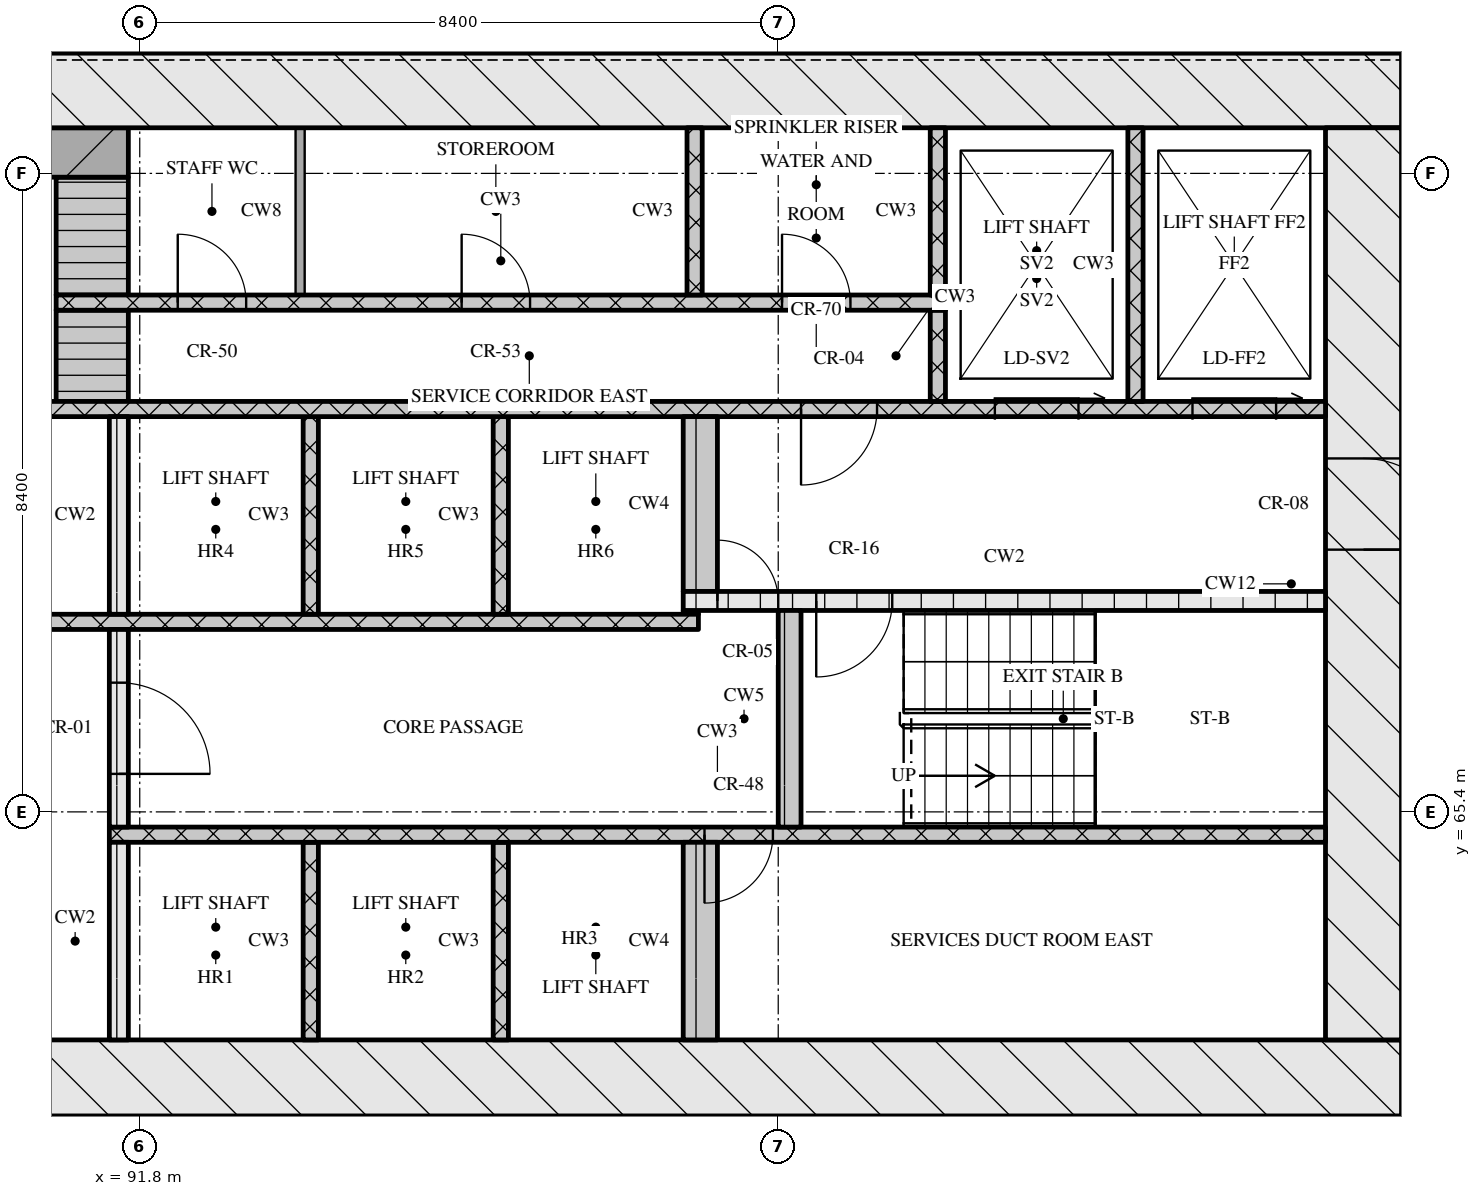
"""IFC4 building model, lengths in metres.
Left out: names, types, materials, properties, quantities, classifications, styles, units other than length and angle.
Written with IfcOpenShell. Run it as: python <this file> out.ifc"""

import sys

from ifc_helpers import new_model, si_unit, direction, frame, frame_2d, origin, place, context, subcontext, project, spatial, rectangle, extrude, element, fill, save


model = new_model("IFC4")
c1 = context("Model", 3, precision=1e-05, world=origin(), true_north=direction((0.0, 1.0)))
c2 = subcontext(c1, "Body", "Model", "MODEL_VIEW")
j1 = project(units=[si_unit("LENGTHUNIT", "METRE"), si_unit("PLANEANGLEUNIT", "RADIAN")], contexts=[c1])
p1 = place(None, origin())
s1 = spatial("IfcSite", under=j1, at=p1, CompositionType="ELEMENT")
p2 = place(p1, origin())
s2 = spatial("IfcBuilding", under=s1, at=p2, CompositionType="ELEMENT")
p3 = place(p2, frame((0.0, 0.0, 106.05)))
s3 = spatial("IfcBuildingStorey", under=s2, at=p3, CompositionType="ELEMENT", Elevation=106.05)
p4 = place(p3, frame((66.8, 61.9, 0.0), z_axis=(0.0, 0.0, 1.0), x_axis=(1.0, 0.0, 0.0)))
e1 = element("IfcWall", 1, at=p4, inside=s3, PredefinedType="SOLIDWALL", context=c2, shape_type="SweptSolid", body=[
    extrude(rectangle(XDim=41.6, YDim=1.0, at=frame_2d((20.8, 0.0))), origin(), (0.0, 0.0, 1.0), 3.32),
])
p5 = place(p4, frame((21.15, 0.0, 0.0)))
e2 = element("IfcOpeningElement", 2, at=p5, cuts=e1, PredefinedType="OPENING", context=c2, shape_type="SweptSolid", body=[
    extrude(rectangle(XDim=1.8, YDim=2.1, at=frame_2d((0.9, 1.05))), frame((0.0, 0.51, 0.0), z_axis=(0.0, -1.0, 0.0), x_axis=(1.0, 0.0, 0.0)), (0.0, 0.0, 1.0), 1.02),
])
p6 = place(p3, frame((66.8, 74.9, 0.0), z_axis=(0.0, 0.0, 1.0), x_axis=(1.0, 0.0, 0.0)))
e3 = element("IfcWall", 3, at=p6, inside=s3, PredefinedType="SOLIDWALL", context=c2, shape_type="SweptSolid", body=[
    extrude(rectangle(XDim=41.6, YDim=1.0, at=frame_2d((20.8, 0.0))), origin(), (0.0, 0.0, 1.0), 3.32),
])
p7 = place(p3, frame((107.9, 62.4, 0.0), z_axis=(0.0, 0.0, 1.0), x_axis=(0.0, 1.0, 0.0)))
e4 = element("IfcWall", 4, at=p7, inside=s3, PredefinedType="SOLIDWALL", context=c2, shape_type="SweptSolid", body=[
    extrude(rectangle(XDim=12.0, YDim=1.0, at=frame_2d((6.0, 0.0))), origin(), (0.0, 0.0, 1.0), 3.32),
])
p8 = place(p7, frame((6.45, 0.0, 0.0)))
e5 = element("IfcOpeningElement", 5, at=p8, cuts=e4, PredefinedType="OPENING", context=c2, shape_type="SweptSolid", body=[
    extrude(rectangle(XDim=1.2, YDim=2.1, at=frame_2d((0.6, 1.05))), frame((0.0, 0.51, 0.0), z_axis=(0.0, -1.0, 0.0), x_axis=(1.0, 0.0, 0.0)), (0.0, 0.0, 1.0), 1.02),
])
p9 = place(p3, frame((91.525, 62.4, 0.0), z_axis=(0.0, 0.0, 1.0), x_axis=(0.0, 1.0, 0.0)))
e6 = element("IfcWall", 6, at=p9, inside=s3, PredefinedType="SOLIDWALL", context=c2, shape_type="SweptSolid", body=[
    extrude(rectangle(XDim=2.6, YDim=0.25, at=frame_2d((1.3, 0.0))), origin(), (0.0, 0.0, 1.0), 3.32),
])
for number, where, z_axis, x_axis in (
    (7, (94.05, 62.4, 0.0), (0.0, 0.0, 1.0), (0.0, 1.0, 0.0)),
    (8, (96.55, 62.4, 0.0), (0.0, 0.0, 1.0), (0.0, 1.0, 0.0)),
):
    element("IfcWall", number, at=place(p3, frame(where, z_axis=z_axis, x_axis=x_axis)), inside=s3, PredefinedType="SOLIDWALL", context=c2, shape_type="SweptSolid", body=[
        extrude(rectangle(XDim=2.6, YDim=0.2, at=frame_2d((1.3, 0.0))), origin(), (0.0, 0.0, 1.0), 3.32),
    ])
p10 = place(p3, frame((99.175, 62.4, 0.0), z_axis=(0.0, 0.0, 1.0), x_axis=(0.0, 1.0, 0.0)))
e9 = element("IfcWall", 9, at=p10, inside=s3, PredefinedType="SOLIDWALL", context=c2, shape_type="SweptSolid", body=[
    extrude(rectangle(XDim=2.6, YDim=0.45, at=frame_2d((1.3, 0.0))), origin(), (0.0, 0.0, 1.0), 3.32),
])
p11 = place(p3, frame((91.4, 65.1, 0.0), z_axis=(0.0, 0.0, 1.0), x_axis=(1.0, 0.0, 0.0)))
e10 = element("IfcWall", 10, at=p11, inside=s3, PredefinedType="SOLIDWALL", context=c2, shape_type="SweptSolid", body=[
    extrude(rectangle(XDim=16.0, YDim=0.2, at=frame_2d((8.0, 0.0))), origin(), (0.0, 0.0, 1.0), 3.32),
])
p12 = place(p11, frame((7.83, 0.0, 0.0)))
e11 = element("IfcOpeningElement", 11, at=p12, cuts=e10, PredefinedType="OPENING", context=c2, shape_type="SweptSolid", body=[
    extrude(rectangle(XDim=0.9, YDim=2.1, at=frame_2d((0.45, 1.05))), frame((0.0, 0.11, 0.0), z_axis=(0.0, -1.0, 0.0), x_axis=(1.0, 0.0, 0.0)), (0.0, 0.0, 1.0), 0.22),
])
p13 = place(p3, frame((91.525, 65.2, 0.0), z_axis=(0.0, 0.0, 1.0), x_axis=(0.0, 1.0, 0.0)))
e12 = element("IfcWall", 12, at=p13, inside=s3, PredefinedType="SOLIDWALL", context=c2, shape_type="SweptSolid", body=[
    extrude(rectangle(XDim=2.6, YDim=0.25, at=frame_2d((1.3, 0.0))), origin(), (0.0, 0.0, 1.0), 3.32),
])
p14 = place(p13, frame((0.7, 0.0, 0.0)))
e13 = element("IfcOpeningElement", 13, at=p14, cuts=e12, PredefinedType="OPENING", context=c2, shape_type="SweptSolid", body=[
    extrude(rectangle(XDim=1.2, YDim=2.1, at=frame_2d((0.6, 1.05))), frame((0.0, 0.135, 0.0), z_axis=(0.0, -1.0, 0.0), x_axis=(1.0, 0.0, 0.0)), (0.0, 0.0, 1.0), 0.27),
])
p15 = place(p3, frame((100.35, 65.2, 0.0), z_axis=(0.0, 0.0, 1.0), x_axis=(0.0, 1.0, 0.0)))
e14 = element("IfcWall", 14, at=p15, inside=s3, PredefinedType="SOLIDWALL", context=c2, shape_type="SweptSolid", body=[
    extrude(rectangle(XDim=2.85, YDim=0.3, at=frame_2d((1.425, 0.0))), origin(), (0.0, 0.0, 1.0), 3.32),
])
p16 = place(p3, frame((76.05, 67.9, 0.0), z_axis=(0.0, 0.0, 1.0), x_axis=(1.0, 0.0, 0.0)))
e15 = element("IfcWall", 15, at=p16, inside=s3, PredefinedType="SOLIDWALL", context=c2, shape_type="SweptSolid", body=[
    extrude(rectangle(XDim=23.1, YDim=0.2, at=frame_2d((11.55, 0.0))), origin(), (0.0, 0.0, 1.0), 3.32),
])
p17 = place(p16, frame((0.6, 0.0, 0.0)))
e16 = element("IfcOpeningElement", 16, at=p17, cuts=e15, PredefinedType="OPENING", context=c2, shape_type="SweptSolid", body=[
    extrude(rectangle(XDim=1.1, YDim=2.1, at=frame_2d((0.55, 1.05))), frame((0.0, 0.11, 0.0), z_axis=(0.0, -1.0, 0.0), x_axis=(1.0, 0.0, 0.0)), (0.0, 0.0, 1.0), 0.22),
])
p18 = place(p16, frame((3.1, 0.0, 0.0)))
e17 = element("IfcOpeningElement", 17, at=p18, cuts=e15, PredefinedType="OPENING", context=c2, shape_type="SweptSolid", body=[
    extrude(rectangle(XDim=1.1, YDim=2.1, at=frame_2d((0.55, 1.05))), frame((0.0, 0.11, 0.0), z_axis=(0.0, -1.0, 0.0), x_axis=(1.0, 0.0, 0.0)), (0.0, 0.0, 1.0), 0.22),
])
p19 = place(p16, frame((5.6, 0.0, 0.0)))
e18 = element("IfcOpeningElement", 18, at=p19, cuts=e15, PredefinedType="OPENING", context=c2, shape_type="SweptSolid", body=[
    extrude(rectangle(XDim=1.1, YDim=2.1, at=frame_2d((0.55, 1.05))), frame((0.0, 0.11, 0.0), z_axis=(0.0, -1.0, 0.0), x_axis=(1.0, 0.0, 0.0)), (0.0, 0.0, 1.0), 0.22),
])
p20 = place(p16, frame((9.7, 0.0, 0.0)))
e19 = element("IfcOpeningElement", 19, at=p20, cuts=e15, PredefinedType="OPENING", context=c2, shape_type="SweptSolid", body=[
    extrude(rectangle(XDim=0.9, YDim=2.1, at=frame_2d((0.45, 1.05))), frame((0.0, 0.11, 0.0), z_axis=(0.0, -1.0, 0.0), x_axis=(1.0, 0.0, 0.0)), (0.0, 0.0, 1.0), 0.22),
])
p21 = place(p16, frame((13.55, 0.0, 0.0)))
e20 = element("IfcOpeningElement", 20, at=p21, cuts=e15, PredefinedType="OPENING", context=c2, shape_type="SweptSolid", body=[
    extrude(rectangle(XDim=1.0, YDim=2.1, at=frame_2d((0.5, 1.05))), frame((0.0, 0.11, 0.0), z_axis=(0.0, -1.0, 0.0), x_axis=(1.0, 0.0, 0.0)), (0.0, 0.0, 1.0), 0.22),
])
p22 = place(p3, frame((91.525, 68.0, 0.0), z_axis=(0.0, 0.0, 1.0), x_axis=(0.0, 1.0, 0.0)))
e21 = element("IfcWall", 21, at=p22, inside=s3, PredefinedType="SOLIDWALL", context=c2, shape_type="SweptSolid", body=[
    extrude(rectangle(XDim=2.6, YDim=0.25, at=frame_2d((1.3, 0.0))), origin(), (0.0, 0.0, 1.0), 3.32),
])
for number, where, z_axis, x_axis in (
    (22, (94.05, 68.0, 0.0), (0.0, 0.0, 1.0), (0.0, 1.0, 0.0)),
    (23, (96.55, 68.0, 0.0), (0.0, 0.0, 1.0), (0.0, 1.0, 0.0)),
):
    element("IfcWall", number, at=place(p3, frame(where, z_axis=z_axis, x_axis=x_axis)), inside=s3, PredefinedType="SOLIDWALL", context=c2, shape_type="SweptSolid", body=[
        extrude(rectangle(XDim=2.6, YDim=0.2, at=frame_2d((1.3, 0.0))), origin(), (0.0, 0.0, 1.0), 3.32),
    ])
p23 = place(p3, frame((98.95, 68.025, 0.0), z_axis=(0.0, 0.0, 1.0), x_axis=(1.0, 0.0, 0.0)))
e24 = element("IfcWall", 24, at=p23, inside=s3, PredefinedType="SOLIDWALL", context=c2, shape_type="SweptSolid", body=[
    extrude(rectangle(XDim=0.2, YDim=0.05, at=frame_2d((0.1, 0.0))), origin(), (0.0, 0.0, 1.0), 3.32),
])
p24 = place(p3, frame((98.95, 68.175, 0.0), z_axis=(0.0, 0.0, 1.0), x_axis=(1.0, 0.0, 0.0)))
e25 = element("IfcWall", 25, at=p24, inside=s3, PredefinedType="SOLIDWALL", context=c2, shape_type="SweptSolid", body=[
    extrude(rectangle(XDim=8.45, YDim=0.25, at=frame_2d((4.225, 0.0))), origin(), (0.0, 0.0, 1.0), 3.32),
])
p25 = place(p24, frame((0.45, 0.0, 0.0)))
e26 = element("IfcOpeningElement", 26, at=p25, cuts=e25, PredefinedType="OPENING", context=c2, shape_type="SweptSolid", body=[
    extrude(rectangle(XDim=0.8, YDim=2.1, at=frame_2d((0.4, 1.05))), frame((0.0, 0.135, 0.0), z_axis=(0.0, -1.0, 0.0), x_axis=(1.0, 0.0, 0.0)), (0.0, 0.0, 1.0), 0.27),
])
p26 = place(p24, frame((1.75, 0.0, 0.0)))
e27 = element("IfcOpeningElement", 27, at=p26, cuts=e25, PredefinedType="OPENING", context=c2, shape_type="SweptSolid", body=[
    extrude(rectangle(XDim=1.0, YDim=2.1, at=frame_2d((0.5, 1.05))), frame((0.0, 0.135, 0.0), z_axis=(0.0, -1.0, 0.0), x_axis=(1.0, 0.0, 0.0)), (0.0, 0.0, 1.0), 0.27),
])
p27 = place(p3, frame((99.175, 68.3, 0.0), z_axis=(0.0, 0.0, 1.0), x_axis=(0.0, 1.0, 0.0)))
e28 = element("IfcWall", 28, at=p27, inside=s3, PredefinedType="SOLIDWALL", context=c2, shape_type="SweptSolid", body=[
    extrude(rectangle(XDim=2.3, YDim=0.45, at=frame_2d((1.15, 0.0))), origin(), (0.0, 0.0, 1.0), 3.32),
])
p28 = place(p3, frame((67.8, 70.7, 0.0), z_axis=(0.0, 0.0, 1.0), x_axis=(1.0, 0.0, 0.0)))
e29 = element("IfcWall", 29, at=p28, inside=s3, PredefinedType="SOLIDWALL", context=c2, shape_type="SweptSolid", body=[
    extrude(rectangle(XDim=39.6, YDim=0.2, at=frame_2d((19.8, 0.0))), origin(), (0.0, 0.0, 1.0), 3.32),
])
p29 = place(p28, frame((0.65, 0.0, 0.0)))
e30 = element("IfcOpeningElement", 30, at=p29, cuts=e29, PredefinedType="OPENING", context=c2, shape_type="SweptSolid", body=[
    extrude(rectangle(XDim=1.1, YDim=2.1, at=frame_2d((0.55, 1.05))), frame((0.0, 0.11, 0.0), z_axis=(0.0, -1.0, 0.0), x_axis=(1.0, 0.0, 0.0)), (0.0, 0.0, 1.0), 0.22),
])
p30 = place(p28, frame((3.25, 0.0, 0.0)))
e31 = element("IfcOpeningElement", 31, at=p30, cuts=e29, PredefinedType="OPENING", context=c2, shape_type="SweptSolid", body=[
    extrude(rectangle(XDim=1.1, YDim=2.1, at=frame_2d((0.55, 1.05))), frame((0.0, 0.11, 0.0), z_axis=(0.0, -1.0, 0.0), x_axis=(1.0, 0.0, 0.0)), (0.0, 0.0, 1.0), 0.22),
])
p31 = place(p28, frame((5.9, 0.0, 0.0)))
e32 = element("IfcOpeningElement", 32, at=p31, cuts=e29, PredefinedType="OPENING", context=c2, shape_type="SweptSolid", body=[
    extrude(rectangle(XDim=1.0, YDim=2.1, at=frame_2d((0.5, 1.05))), frame((0.0, 0.11, 0.0), z_axis=(0.0, -1.0, 0.0), x_axis=(1.0, 0.0, 0.0)), (0.0, 0.0, 1.0), 0.22),
])
p32 = place(p28, frame((21.7, 0.0, 0.0)))
e33 = element("IfcOpeningElement", 33, at=p32, cuts=e29, PredefinedType="OPENING", context=c2, shape_type="SweptSolid", body=[
    extrude(rectangle(XDim=1.0, YDim=2.1, at=frame_2d((0.5, 1.05))), frame((0.0, 0.11, 0.0), z_axis=(0.0, -1.0, 0.0), x_axis=(1.0, 0.0, 0.0)), (0.0, 0.0, 1.0), 0.22),
])
p33 = place(p28, frame((32.7, 0.0, 0.0)))
e34 = element("IfcOpeningElement", 34, at=p33, cuts=e29, PredefinedType="OPENING", context=c2, shape_type="SweptSolid", body=[
    extrude(rectangle(XDim=1.0, YDim=2.1, at=frame_2d((0.5, 1.05))), frame((0.0, 0.11, 0.0), z_axis=(0.0, -1.0, 0.0), x_axis=(1.0, 0.0, 0.0)), (0.0, 0.0, 1.0), 0.22),
])
p34 = place(p28, frame((35.25, 0.0, 0.0)))
e35 = element("IfcOpeningElement", 35, at=p34, cuts=e29, PredefinedType="OPENING", context=c2, shape_type="SweptSolid", body=[
    extrude(rectangle(XDim=1.1, YDim=2.1, at=frame_2d((0.55, 1.05))), frame((0.0, 0.11, 0.0), z_axis=(0.0, -1.0, 0.0), x_axis=(1.0, 0.0, 0.0)), (0.0, 0.0, 1.0), 0.22),
])
p35 = place(p28, frame((37.85, 0.0, 0.0)))
e36 = element("IfcOpeningElement", 36, at=p35, cuts=e29, PredefinedType="OPENING", context=c2, shape_type="SweptSolid", body=[
    extrude(rectangle(XDim=1.1, YDim=2.1, at=frame_2d((0.55, 1.05))), frame((0.0, 0.11, 0.0), z_axis=(0.0, -1.0, 0.0), x_axis=(1.0, 0.0, 0.0)), (0.0, 0.0, 1.0), 0.22),
])
p36 = place(p3, frame((91.175, 70.8, 0.0), z_axis=(0.0, 0.0, 1.0), x_axis=(0.0, 1.0, 0.0)))
e37 = element("IfcWall", 37, at=p36, inside=s3, PredefinedType="SOLIDWALL", context=c2, shape_type="SweptSolid", body=[
    extrude(rectangle(XDim=1.2, YDim=0.95, at=frame_2d((0.6, 0.0))), origin(), (0.0, 0.0, 1.0), 3.32),
])
p37 = place(p3, frame((102.3, 70.8, 0.0), z_axis=(0.0, 0.0, 1.0), x_axis=(0.0, 1.0, 0.0)))
e38 = element("IfcWall", 38, at=p37, inside=s3, PredefinedType="SOLIDWALL", context=c2, shape_type="SweptSolid", body=[
    extrude(rectangle(XDim=1.2, YDim=0.2, at=frame_2d((0.6, 0.0))), origin(), (0.0, 0.0, 1.0), 3.32),
])
p38 = place(p3, frame((104.9, 70.8, 0.0), z_axis=(0.0, 0.0, 1.0), x_axis=(0.0, 1.0, 0.0)))
e39 = element("IfcWall", 39, at=p38, inside=s3, PredefinedType="SOLIDWALL", context=c2, shape_type="SweptSolid", body=[
    extrude(rectangle(XDim=3.6, YDim=0.2, at=frame_2d((1.8, 0.0))), origin(), (0.0, 0.0, 1.0), 3.32),
])
p39 = place(p3, frame((90.7, 72.1, 0.0), z_axis=(0.0, 0.0, 1.0), x_axis=(1.0, 0.0, 0.0)))
e40 = element("IfcWall", 40, at=p39, inside=s3, PredefinedType="SOLIDWALL", context=c2, shape_type="SweptSolid", body=[
    extrude(rectangle(XDim=11.7, YDim=0.2, at=frame_2d((5.85, 0.0))), origin(), (0.0, 0.0, 1.0), 3.32),
])
p40 = place(p39, frame((1.6, 0.0, 0.0)))
e41 = element("IfcOpeningElement", 41, at=p40, cuts=e40, PredefinedType="OPENING", context=c2, shape_type="SweptSolid", body=[
    extrude(rectangle(XDim=0.9, YDim=2.1, at=frame_2d((0.45, 1.05))), frame((0.0, 0.11, 0.0), z_axis=(0.0, -1.0, 0.0), x_axis=(1.0, 0.0, 0.0)), (0.0, 0.0, 1.0), 0.22),
])
p41 = place(p39, frame((5.335, 0.0, 0.0)))
e42 = element("IfcOpeningElement", 42, at=p41, cuts=e40, PredefinedType="OPENING", context=c2, shape_type="SweptSolid", body=[
    extrude(rectangle(XDim=0.9, YDim=2.1, at=frame_2d((0.45, 1.05))), frame((0.0, 0.11, 0.0), z_axis=(0.0, -1.0, 0.0), x_axis=(1.0, 0.0, 0.0)), (0.0, 0.0, 1.0), 0.22),
])
p42 = place(p39, frame((9.55, 0.0, 0.0)))
e43 = element("IfcOpeningElement", 43, at=p42, cuts=e40, PredefinedType="OPENING", context=c2, shape_type="SweptSolid", body=[
    extrude(rectangle(XDim=0.9, YDim=2.1, at=frame_2d((0.45, 1.05))), frame((0.0, 0.11, 0.0), z_axis=(0.0, -1.0, 0.0), x_axis=(1.0, 0.0, 0.0)), (0.0, 0.0, 1.0), 0.22),
])
p43 = place(p3, frame((91.175, 72.2, 0.0), z_axis=(0.0, 0.0, 1.0), x_axis=(0.0, 1.0, 0.0)))
e44 = element("IfcWall", 44, at=p43, inside=s3, PredefinedType="SOLIDWALL", context=c2, shape_type="SweptSolid", body=[
    extrude(rectangle(XDim=1.55, YDim=0.95, at=frame_2d((0.775, 0.0))), origin(), (0.0, 0.0, 1.0), 3.32),
])
p44 = place(p3, frame((93.91, 72.2, 0.0), z_axis=(0.0, 0.0, 1.0), x_axis=(0.0, 1.0, 0.0)))
e45 = element("IfcWall", 45, at=p44, inside=s3, PredefinedType="PARTITIONING", context=c2, shape_type="SweptSolid", body=[
    extrude(rectangle(XDim=2.2, YDim=0.12, at=frame_2d((1.1, 0.0))), origin(), (0.0, 0.0, 1.0), 3.32),
])
for number, where, z_axis, x_axis in (
    (46, (99.1, 72.2, 0.0), (0.0, 0.0, 1.0), (0.0, 1.0, 0.0)),
    (47, (102.3, 72.2, 0.0), (0.0, 0.0, 1.0), (0.0, 1.0, 0.0)),
):
    element("IfcWall", number, at=place(p3, frame(where, z_axis=z_axis, x_axis=x_axis)), inside=s3, PredefinedType="SOLIDWALL", context=c2, shape_type="SweptSolid", body=[
        extrude(rectangle(XDim=2.2, YDim=0.2, at=frame_2d((1.1, 0.0))), origin(), (0.0, 0.0, 1.0), 3.32),
    ])
p45 = place(p3, frame((83.55, 74.075, 0.0), z_axis=(0.0, 0.0, 1.0), x_axis=(1.0, 0.0, 0.0)))
e48 = element("IfcWall", 48, at=p45, inside=s3, PredefinedType="SOLIDWALL", context=c2, shape_type="SweptSolid", body=[
    extrude(rectangle(XDim=8.1, YDim=0.65, at=frame_2d((4.05, 0.0))), origin(), (0.0, 0.0, 1.0), 3.32),
])
p46 = place(p12, origin())
e49 = element("IfcDoor", 49, at=p46, inside=s3, OperationType="SINGLE_SWING_RIGHT", PredefinedType="DOOR", context=c2, shape_type="SweptSolid", body=[
    extrude(rectangle(XDim=0.9, YDim=2.1, at=frame_2d((0.45, 1.05))), frame((0.0, 0.025, 0.0), z_axis=(0.0, -1.0, 0.0), x_axis=(1.0, 0.0, 0.0)), (0.0, 0.0, 1.0), 0.05),
])
fill(e11, e49)
p47 = place(p14, origin())
e50 = element("IfcDoor", 50, at=p47, inside=s3, OperationType="SINGLE_SWING_RIGHT", PredefinedType="DOOR", context=c2, shape_type="SweptSolid", body=[
    extrude(rectangle(XDim=1.2, YDim=2.1, at=frame_2d((0.6, 1.05))), frame((0.0, 0.025, 0.0), z_axis=(0.0, -1.0, 0.0), x_axis=(1.0, 0.0, 0.0)), (0.0, 0.0, 1.0), 0.05),
])
fill(e13, e50)
p48 = place(p25, origin())
e51 = element("IfcDoor", 51, at=p48, inside=s3, OperationType="SINGLE_SWING_LEFT", PredefinedType="DOOR", context=c2, shape_type="SweptSolid", body=[
    extrude(rectangle(XDim=0.8, YDim=2.1, at=frame_2d((0.4, 1.05))), frame((0.0, 0.025, 0.0), z_axis=(0.0, -1.0, 0.0), x_axis=(1.0, 0.0, 0.0)), (0.0, 0.0, 1.0), 0.05),
])
fill(e26, e51)
p49 = place(p26, origin())
e52 = element("IfcDoor", 52, at=p49, inside=s3, OperationType="SINGLE_SWING_RIGHT", PredefinedType="DOOR", context=c2, shape_type="SweptSolid", body=[
    extrude(rectangle(XDim=1.0, YDim=2.1, at=frame_2d((0.5, 1.05))), frame((0.0, 0.025, 0.0), z_axis=(0.0, -1.0, 0.0), x_axis=(1.0, 0.0, 0.0)), (0.0, 0.0, 1.0), 0.05),
])
fill(e27, e52)
p50 = place(p8, origin())
e53 = element("IfcDoor", 53, at=p50, inside=s3, OperationType="SINGLE_SWING_RIGHT", PredefinedType="DOOR", context=c2, shape_type="SweptSolid", body=[
    extrude(rectangle(XDim=1.2, YDim=2.1, at=frame_2d((0.6, 1.05))), frame((0.0, 0.025, 0.0), z_axis=(0.0, -1.0, 0.0), x_axis=(1.0, 0.0, 0.0)), (0.0, 0.0, 1.0), 0.05),
])
fill(e5, e53)
p51 = place(p33, origin())
e54 = element("IfcDoor", 54, at=p51, inside=s3, OperationType="SINGLE_SWING_RIGHT", PredefinedType="DOOR", context=c2, shape_type="SweptSolid", body=[
    extrude(rectangle(XDim=1.0, YDim=2.1, at=frame_2d((0.5, 1.05))), frame((0.0, 0.025, 0.0), z_axis=(0.0, -1.0, 0.0), x_axis=(1.0, 0.0, 0.0)), (0.0, 0.0, 1.0), 0.05),
])
fill(e34, e54)
p52 = place(p34, origin())
e55 = element("IfcDoor", 55, at=p52, inside=s3, OperationType="SLIDING_TO_RIGHT", PredefinedType="DOOR", context=c2, shape_type="SweptSolid", body=[
    extrude(rectangle(XDim=1.1, YDim=2.1, at=frame_2d((0.55, 1.05))), frame((0.0, 0.025, 0.0), z_axis=(0.0, -1.0, 0.0), x_axis=(1.0, 0.0, 0.0)), (0.0, 0.0, 1.0), 0.05),
])
fill(e35, e55)
p53 = place(p35, origin())
e56 = element("IfcDoor", 56, at=p53, inside=s3, OperationType="SLIDING_TO_RIGHT", PredefinedType="DOOR", context=c2, shape_type="SweptSolid", body=[
    extrude(rectangle(XDim=1.1, YDim=2.1, at=frame_2d((0.55, 1.05))), frame((0.0, 0.025, 0.0), z_axis=(0.0, -1.0, 0.0), x_axis=(1.0, 0.0, 0.0)), (0.0, 0.0, 1.0), 0.05),
])
fill(e36, e56)
p54 = place(p40, origin())
e57 = element("IfcDoor", 57, at=p54, inside=s3, OperationType="SINGLE_SWING_LEFT", PredefinedType="DOOR", context=c2, shape_type="SweptSolid", body=[
    extrude(rectangle(XDim=0.9, YDim=2.1, at=frame_2d((0.45, 1.05))), frame((0.0, 0.025, 0.0), z_axis=(0.0, -1.0, 0.0), x_axis=(1.0, 0.0, 0.0)), (0.0, 0.0, 1.0), 0.05),
])
fill(e41, e57)
p55 = place(p41, origin())
e58 = element("IfcDoor", 58, at=p55, inside=s3, OperationType="SINGLE_SWING_LEFT", PredefinedType="DOOR", context=c2, shape_type="SweptSolid", body=[
    extrude(rectangle(XDim=0.9, YDim=2.1, at=frame_2d((0.45, 1.05))), frame((0.0, 0.025, 0.0), z_axis=(0.0, -1.0, 0.0), x_axis=(1.0, 0.0, 0.0)), (0.0, 0.0, 1.0), 0.05),
])
fill(e42, e58)
p56 = place(p42, origin())
e59 = element("IfcDoor", 59, at=p56, inside=s3, OperationType="SINGLE_SWING_LEFT", PredefinedType="DOOR", context=c2, shape_type="SweptSolid", body=[
    extrude(rectangle(XDim=0.9, YDim=2.1, at=frame_2d((0.45, 1.05))), frame((0.0, 0.025, 0.0), z_axis=(0.0, -1.0, 0.0), x_axis=(1.0, 0.0, 0.0)), (0.0, 0.0, 1.0), 0.05),
])
fill(e43, e59)
save(model, sys.argv[1])
